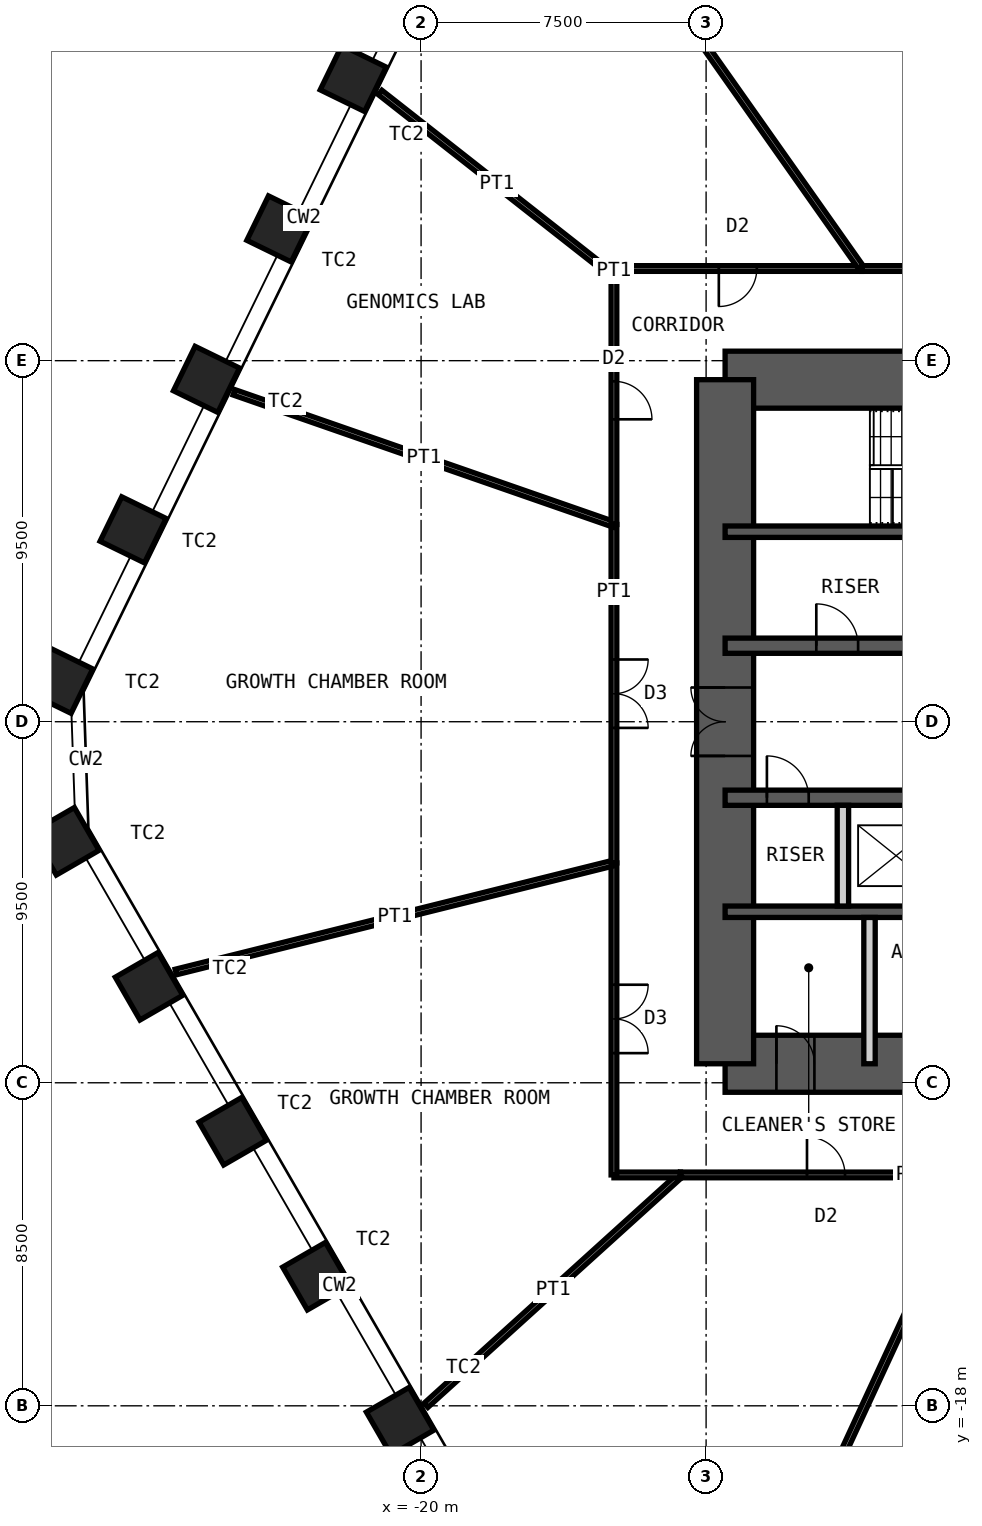
"""IFC4 building model, lengths in metres.
Left out: names, types, materials, properties, quantities, classifications, styles, units other than length and angle.
Written with IfcOpenShell. Run it as: python <this file> out.ifc"""

import sys

from ifc_helpers import new_model, si_unit, direction, frame, frame_2d, origin, origin_2d, place, context, subcontext, project, spatial, rectangle, hollow_rectangle, extrude, element, fill, save


model = new_model("IFC4")
c1 = context("Model", 3, precision=1e-05, world=origin(), true_north=direction((0.0, 1.0)))
c2 = subcontext(c1, "Body", "Model", "MODEL_VIEW")
j1 = project(units=[si_unit("LENGTHUNIT", "METRE"), si_unit("PLANEANGLEUNIT", "RADIAN")], contexts=[c1])
p1 = place(None, origin())
s1 = spatial("IfcSite", under=j1, at=p1, CompositionType="ELEMENT")
p2 = place(p1, origin())
s2 = spatial("IfcBuilding", under=s1, at=p2, CompositionType="ELEMENT")
p3 = place(p2, frame((0.0, 0.0, 82.0)))
s3 = spatial("IfcBuildingStorey", under=s2, at=p3, CompositionType="ELEMENT", Elevation=82.0)
for number, where, z_axis, x_axis in (
    (1, (-20.552, -18.404, 0.0), (0.0, 0.0, 1.0), (0.5, -0.866, 0.0)),
    (2, (-22.754, -14.589, 0.0), (0.0, 0.0, 1.0), (0.5, -0.866, 0.0)),
    (3, (-24.956, -10.775, 0.0), (0.0, 0.0, 1.0), (0.5, -0.866, 0.0)),
    (4, (-27.158, -6.96, 0.0), (0.0, 0.0, 1.0), (0.5, -0.866, 0.0)),
    (5, (-29.361, -3.146, 0.0), (0.0, 0.0, 1.0), (0.5, -0.866, 0.0)),
    (6, (-29.509, 1.09, 0.0), (0.0, 0.0, 1.0), (-0.438, -0.899, 0.0)),
    (7, (-27.578, 5.049, 0.0), (0.0, 0.0, 1.0), (-0.438, -0.899, 0.0)),
    (8, (-25.647, 9.008, 0.0), (0.0, 0.0, 1.0), (-0.438, -0.899, 0.0)),
    (9, (-23.716, 12.966, 0.0), (0.0, 0.0, 1.0), (-0.438, -0.899, 0.0)),
    (10, (-21.785, 16.925, 0.0), (0.0, 0.0, 1.0), (-0.438, -0.899, 0.0)),
):
    element("IfcColumn", number, at=place(p3, frame(where, z_axis=z_axis, x_axis=x_axis)), inside=s3, PredefinedType="COLUMN", context=c2, shape_type="SweptSolid", body=[
        extrude(hollow_rectangle(XDim=1.3, YDim=1.3, WallThickness=0.1, at=origin_2d()), origin(), (0.0, 0.0, 1.0), 5.0),
    ])
p4 = place(p3, frame((-12.0, 9.0, 0.0), z_axis=(0.0, 0.0, 1.0), x_axis=(1.0, 0.0, 0.0)))
e11 = element("IfcWall", 11, at=p4, inside=s3, PredefinedType="SHEAR", context=c2, shape_type="SweptSolid", body=[
    extrude(rectangle(XDim=24.0, YDim=1.5, at=frame_2d((12.0, 0.0))), origin(), (0.0, 0.0, 1.0), 5.0),
])
p5 = place(p4, frame((10.4, 0.0, 0.0)))
e12 = element("IfcOpeningElement", 12, at=p5, cuts=e11, PredefinedType="OPENING", context=c2, shape_type="SweptSolid", body=[
    extrude(rectangle(XDim=1.0, YDim=2.1, at=frame_2d((0.5, 1.05))), frame((0.0, 0.76, 0.0), z_axis=(0.0, -1.0, 0.0), x_axis=(1.0, 0.0, 0.0)), (0.0, 0.0, 1.0), 1.52),
])
p6 = place(p4, frame((17.6, 0.0, 0.0)))
e13 = element("IfcOpeningElement", 13, at=p6, cuts=e11, PredefinedType="OPENING", context=c2, shape_type="SweptSolid", body=[
    extrude(rectangle(XDim=0.9, YDim=2.1, at=frame_2d((0.45, 1.05))), frame((0.0, 0.76, 0.0), z_axis=(0.0, -1.0, 0.0), x_axis=(1.0, 0.0, 0.0)), (0.0, 0.0, 1.0), 1.52),
])
p7 = place(p4, frame((21.9, 0.0, 0.0)))
e14 = element("IfcOpeningElement", 14, at=p7, cuts=e11, PredefinedType="OPENING", context=c2, shape_type="SweptSolid", body=[
    extrude(rectangle(XDim=0.9, YDim=2.1, at=frame_2d((0.45, 1.05))), frame((0.0, 0.76, 0.0), z_axis=(0.0, -1.0, 0.0), x_axis=(1.0, 0.0, 0.0)), (0.0, 0.0, 1.0), 1.52),
])
p8 = place(p3, frame((-12.0, -9.0, 0.0), z_axis=(0.0, 0.0, 1.0), x_axis=(1.0, 0.0, 0.0)))
e15 = element("IfcWall", 15, at=p8, inside=s3, PredefinedType="SHEAR", context=c2, shape_type="SweptSolid", body=[
    extrude(rectangle(XDim=24.0, YDim=1.5, at=frame_2d((12.0, 0.0))), origin(), (0.0, 0.0, 1.0), 5.0),
])
p9 = place(p8, frame((1.35, 0.0, 0.0)))
e16 = element("IfcOpeningElement", 16, at=p9, cuts=e15, PredefinedType="OPENING", context=c2, shape_type="SweptSolid", body=[
    extrude(rectangle(XDim=1.0, YDim=2.1, at=frame_2d((0.5, 1.05))), frame((0.0, 0.76, 0.0), z_axis=(0.0, -1.0, 0.0), x_axis=(1.0, 0.0, 0.0)), (0.0, 0.0, 1.0), 1.52),
])
p10 = place(p8, frame((5.325, 0.0, 0.0)))
e17 = element("IfcOpeningElement", 17, at=p10, cuts=e15, PredefinedType="OPENING", context=c2, shape_type="SweptSolid", body=[
    extrude(rectangle(XDim=1.15, YDim=2.1, at=frame_2d((0.575, 1.05))), frame((0.0, 0.76, 0.0), z_axis=(0.0, -1.0, 0.0), x_axis=(1.0, 0.0, 0.0)), (0.0, 0.0, 1.0), 1.52),
])
p11 = place(p8, frame((12.6, 0.0, 0.0)))
e18 = element("IfcOpeningElement", 18, at=p11, cuts=e15, PredefinedType="OPENING", context=c2, shape_type="SweptSolid", body=[
    extrude(rectangle(XDim=1.0, YDim=2.1, at=frame_2d((0.5, 1.05))), frame((0.0, 0.76, 0.0), z_axis=(0.0, -1.0, 0.0), x_axis=(1.0, 0.0, 0.0)), (0.0, 0.0, 1.0), 1.52),
])
p12 = place(p3, frame((-12.0, -9.0, 0.0), z_axis=(0.0, 0.0, 1.0), x_axis=(0.0, 1.0, 0.0)))
e19 = element("IfcWall", 19, at=p12, inside=s3, PredefinedType="SHEAR", context=c2, shape_type="SweptSolid", body=[
    extrude(rectangle(XDim=18.0, YDim=1.5, at=frame_2d((9.0, 0.0))), origin(), (0.0, 0.0, 1.0), 5.0),
])
p13 = place(p12, frame((8.1, 0.0, 0.0)))
e20 = element("IfcOpeningElement", 20, at=p13, cuts=e19, PredefinedType="OPENING", context=c2, shape_type="SweptSolid", body=[
    extrude(rectangle(XDim=1.8, YDim=2.1, at=frame_2d((0.9, 1.05))), frame((0.0, 0.76, 0.0), z_axis=(0.0, -1.0, 0.0), x_axis=(1.0, 0.0, 0.0)), (0.0, 0.0, 1.0), 1.52),
])
p14 = place(p3, frame((-12.0, 5.0, 0.0), z_axis=(0.0, 0.0, 1.0), x_axis=(1.0, 0.0, 0.0)))
e21 = element("IfcWall", 21, at=p14, inside=s3, PredefinedType="SHEAR", context=c2, shape_type="SweptSolid", body=[
    extrude(rectangle(XDim=24.0, YDim=0.3, at=frame_2d((12.0, 0.0))), origin(), (0.0, 0.0, 1.0), 5.0),
])
p15 = place(p3, frame((-12.0, 2.0, 0.0), z_axis=(0.0, 0.0, 1.0), x_axis=(1.0, 0.0, 0.0)))
e22 = element("IfcWall", 22, at=p15, inside=s3, PredefinedType="SHEAR", context=c2, shape_type="SweptSolid", body=[
    extrude(rectangle(XDim=24.0, YDim=0.4, at=frame_2d((12.0, 0.0))), origin(), (0.0, 0.0, 1.0), 5.0),
])
p16 = place(p15, frame((2.4, 0.0, 0.0)))
e23 = element("IfcOpeningElement", 23, at=p16, cuts=e22, PredefinedType="OPENING", context=c2, shape_type="SweptSolid", body=[
    extrude(rectangle(XDim=1.1, YDim=2.1, at=frame_2d((0.55, 1.05))), frame((0.0, 0.21, 0.0), z_axis=(0.0, -1.0, 0.0), x_axis=(1.0, 0.0, 0.0)), (0.0, 0.0, 1.0), 0.42),
])
p17 = place(p15, frame((22.0, 0.0, 0.0)))
e24 = element("IfcOpeningElement", 24, at=p17, cuts=e22, PredefinedType="OPENING", context=c2, shape_type="SweptSolid", body=[
    extrude(rectangle(XDim=1.1, YDim=2.1, at=frame_2d((0.55, 1.05))), frame((0.0, 0.21, 0.0), z_axis=(0.0, -1.0, 0.0), x_axis=(1.0, 0.0, 0.0)), (0.0, 0.0, 1.0), 0.42),
])
p18 = place(p15, frame((10.15, 0.0, 0.0)))
e25 = element("IfcOpeningElement", 25, at=p18, cuts=e22, PredefinedType="OPENING", context=c2, shape_type="SweptSolid", body=[
    extrude(rectangle(XDim=1.0, YDim=2.1, at=frame_2d((0.5, 1.05))), frame((0.0, 0.21, 0.0), z_axis=(0.0, -1.0, 0.0), x_axis=(1.0, 0.0, 0.0)), (0.0, 0.0, 1.0), 0.42),
])
p19 = place(p15, frame((6.7, 0.0, 0.0)))
e26 = element("IfcOpeningElement", 26, at=p19, cuts=e22, PredefinedType="OPENING", context=c2, shape_type="SweptSolid", body=[
    extrude(rectangle(XDim=1.4, YDim=2.4, at=frame_2d((0.7, 1.2))), frame((0.0, 0.21, 0.0), z_axis=(0.0, -1.0, 0.0), x_axis=(1.0, 0.0, 0.0)), (0.0, 0.0, 1.0), 0.42),
])
p20 = place(p15, frame((13.35, 0.0, 0.0)))
e27 = element("IfcOpeningElement", 27, at=p20, cuts=e22, PredefinedType="OPENING", context=c2, shape_type="SweptSolid", body=[
    extrude(rectangle(XDim=1.1, YDim=2.4, at=frame_2d((0.55, 1.2))), frame((0.0, 0.21, 0.0), z_axis=(0.0, -1.0, 0.0), x_axis=(1.0, 0.0, 0.0)), (0.0, 0.0, 1.0), 0.42),
])
p21 = place(p15, frame((16.15, 0.0, 0.0)))
e28 = element("IfcOpeningElement", 28, at=p21, cuts=e22, PredefinedType="OPENING", context=c2, shape_type="SweptSolid", body=[
    extrude(rectangle(XDim=1.1, YDim=2.4, at=frame_2d((0.55, 1.2))), frame((0.0, 0.21, 0.0), z_axis=(0.0, -1.0, 0.0), x_axis=(1.0, 0.0, 0.0)), (0.0, 0.0, 1.0), 0.42),
])
p22 = place(p15, frame((18.95, 0.0, 0.0)))
e29 = element("IfcOpeningElement", 29, at=p22, cuts=e22, PredefinedType="OPENING", context=c2, shape_type="SweptSolid", body=[
    extrude(rectangle(XDim=1.1, YDim=2.4, at=frame_2d((0.55, 1.2))), frame((0.0, 0.21, 0.0), z_axis=(0.0, -1.0, 0.0), x_axis=(1.0, 0.0, 0.0)), (0.0, 0.0, 1.0), 0.42),
])
p23 = place(p3, frame((-12.0, -2.0, 0.0), z_axis=(0.0, 0.0, 1.0), x_axis=(1.0, 0.0, 0.0)))
e30 = element("IfcWall", 30, at=p23, inside=s3, PredefinedType="SHEAR", context=c2, shape_type="SweptSolid", body=[
    extrude(rectangle(XDim=24.0, YDim=0.4, at=frame_2d((12.0, 0.0))), origin(), (0.0, 0.0, 1.0), 5.0),
])
p24 = place(p23, frame((1.1, 0.0, 0.0)))
e31 = element("IfcOpeningElement", 31, at=p24, cuts=e30, PredefinedType="OPENING", context=c2, shape_type="SweptSolid", body=[
    extrude(rectangle(XDim=1.1, YDim=2.1, at=frame_2d((0.55, 1.05))), frame((0.0, 0.21, 0.0), z_axis=(0.0, -1.0, 0.0), x_axis=(1.0, 0.0, 0.0)), (0.0, 0.0, 1.0), 0.42),
])
p25 = place(p23, frame((13.55, 0.0, 0.0)))
e32 = element("IfcOpeningElement", 32, at=p25, cuts=e30, PredefinedType="OPENING", context=c2, shape_type="SweptSolid", body=[
    extrude(rectangle(XDim=1.1, YDim=2.1, at=frame_2d((0.55, 1.05))), frame((0.0, 0.21, 0.0), z_axis=(0.0, -1.0, 0.0), x_axis=(1.0, 0.0, 0.0)), (0.0, 0.0, 1.0), 0.42),
])
p26 = place(p23, frame((20.7, 0.0, 0.0)))
e33 = element("IfcOpeningElement", 33, at=p26, cuts=e30, PredefinedType="OPENING", context=c2, shape_type="SweptSolid", body=[
    extrude(rectangle(XDim=1.1, YDim=2.1, at=frame_2d((0.55, 1.05))), frame((0.0, 0.21, 0.0), z_axis=(0.0, -1.0, 0.0), x_axis=(1.0, 0.0, 0.0)), (0.0, 0.0, 1.0), 0.42),
])
p27 = place(p3, frame((-12.0, -5.0, 0.0), z_axis=(0.0, 0.0, 1.0), x_axis=(1.0, 0.0, 0.0)))
e34 = element("IfcWall", 34, at=p27, inside=s3, PredefinedType="SHEAR", context=c2, shape_type="SweptSolid", body=[
    extrude(rectangle(XDim=24.0, YDim=0.3, at=frame_2d((12.0, 0.0))), origin(), (0.0, 0.0, 1.0), 5.0),
])
p28 = place(p3, frame((-8.9, -4.85, 0.0), z_axis=(0.0, 0.0, 1.0), x_axis=(0.0, 1.0, 0.0)))
e35 = element("IfcWall", 35, at=p28, inside=s3, PredefinedType="PARTITIONING", context=c2, shape_type="SweptSolid", body=[
    extrude(rectangle(XDim=2.65, YDim=0.3, at=frame_2d((1.325, 0.0))), origin(), (0.0, 0.0, 1.0), 4.78),
])
p29 = place(p3, frame((-8.2, -9.0, 0.0), z_axis=(0.0, 0.0, 1.0), x_axis=(0.0, 1.0, 0.0)))
e36 = element("IfcWall", 36, at=p29, inside=s3, PredefinedType="PARTITIONING", context=c2, shape_type="SweptSolid", body=[
    extrude(rectangle(XDim=3.85, YDim=0.3, at=frame_2d((1.925, 0.0))), origin(), (0.0, 0.0, 1.0), 4.78),
])
p30 = place(p3, frame((-12.56, -27.155, 0.0), z_axis=(0.0, 0.0, 1.0), x_axis=(0.41979248878, 0.90762011126, 0.0)))
e37 = element("IfcWall", 37, at=p30, inside=s3, PredefinedType="PARTITIONING", context=c2, shape_type="SweptSolid", body=[
    extrude(rectangle(XDim=16.78, YDim=0.15, at=frame_2d((8.39, 0.0))), origin(), (0.0, 0.0, 1.0), 3.7),
])
p31 = place(p3, frame((-5.516, -11.925, 0.0), z_axis=(0.0, 0.0, 1.0), x_axis=(-1.0, 0.0, 0.0)))
e38 = element("IfcWall", 38, at=p31, inside=s3, PredefinedType="PARTITIONING", context=c2, shape_type="SweptSolid", body=[
    extrude(rectangle(XDim=7.659, YDim=0.15, at=frame_2d((3.83, 0.0))), origin(), (0.0, 0.0, 1.0), 4.8),
])
p32 = place(p31, frame((3.329, 0.0, 0.0)))
e39 = element("IfcOpeningElement", 39, at=p32, cuts=e38, PredefinedType="OPENING", context=c2, shape_type="SweptSolid", body=[
    extrude(rectangle(XDim=1.0, YDim=2.4, at=frame_2d((0.5, 1.2))), frame((0.0, 0.085, 0.0), z_axis=(0.0, -1.0, 0.0), x_axis=(1.0, 0.0, 0.0)), (0.0, 0.0, 1.0), 0.17),
])
p33 = place(p3, frame((-19.871, -17.987, 0.0), z_axis=(0.0, 0.0, 1.0), x_axis=(0.741383998931, 0.671081042892, 0.0)))
e40 = element("IfcWall", 40, at=p33, inside=s3, PredefinedType="PARTITIONING", context=c2, shape_type="SweptSolid", body=[
    extrude(rectangle(XDim=9.032, YDim=0.15, at=frame_2d((4.516, 0.0))), origin(), (0.0, 0.0, 1.0), 3.7),
])
p34 = place(p3, frame((-13.175, -11.925, 0.0), z_axis=(0.0, 0.0, 1.0), x_axis=(-1.0, 0.0, 0.0)))
e41 = element("IfcWall", 41, at=p34, inside=s3, PredefinedType="PARTITIONING", context=c2, shape_type="SweptSolid", body=[
    extrude(rectangle(XDim=1.75, YDim=0.15, at=frame_2d((0.875, 0.0))), origin(), (0.0, 0.0, 1.0), 4.8),
])
p35 = place(p3, frame((-14.925, -11.925, 0.0), z_axis=(0.0, 0.0, 1.0), x_axis=(0.0, 1.0, 0.0)))
e42 = element("IfcWall", 42, at=p35, inside=s3, PredefinedType="PARTITIONING", context=c2, shape_type="SweptSolid", body=[
    extrude(rectangle(XDim=8.209, YDim=0.15, at=frame_2d((4.105, 0.0))), origin(), (0.0, 0.0, 1.0), 4.8),
])
p36 = place(p35, frame((3.205, 0.0, 0.0)))
e43 = element("IfcOpeningElement", 43, at=p36, cuts=e42, PredefinedType="OPENING", context=c2, shape_type="SweptSolid", body=[
    extrude(rectangle(XDim=1.8, YDim=2.4, at=frame_2d((0.9, 1.2))), frame((0.0, 0.085, 0.0), z_axis=(0.0, -1.0, 0.0), x_axis=(1.0, 0.0, 0.0)), (0.0, 0.0, 1.0), 0.17),
])
p37 = place(p3, frame((-26.455, -6.586, 0.0), z_axis=(0.0, 0.0, 1.0), x_axis=(0.970383745231, 0.241568596864, 0.0)))
e44 = element("IfcWall", 44, at=p37, inside=s3, PredefinedType="PARTITIONING", context=c2, shape_type="SweptSolid", body=[
    extrude(rectangle(XDim=11.882, YDim=0.15, at=frame_2d((5.941, 0.0))), origin(), (0.0, 0.0, 1.0), 3.7),
])
p38 = place(p3, frame((-14.925, -3.716, 0.0), z_axis=(0.0, 0.0, 1.0), x_axis=(0.0, 1.0, 0.0)))
e45 = element("IfcWall", 45, at=p38, inside=s3, PredefinedType="PARTITIONING", context=c2, shape_type="SweptSolid", body=[
    extrude(rectangle(XDim=8.906, YDim=0.15, at=frame_2d((4.453, 0.0))), origin(), (0.0, 0.0, 1.0), 4.8),
])
p39 = place(p38, frame((3.553, 0.0, 0.0)))
e46 = element("IfcOpeningElement", 46, at=p39, cuts=e45, PredefinedType="OPENING", context=c2, shape_type="SweptSolid", body=[
    extrude(rectangle(XDim=1.8, YDim=2.4, at=frame_2d((0.9, 1.2))), frame((0.0, 0.085, 0.0), z_axis=(0.0, -1.0, 0.0), x_axis=(1.0, 0.0, 0.0)), (0.0, 0.0, 1.0), 0.17),
])
p40 = place(p3, frame((-24.923, 8.668, 0.0), z_axis=(0.0, 0.0, 1.0), x_axis=(0.944507686068, -0.328489316354, 0.0)))
e47 = element("IfcWall", 47, at=p40, inside=s3, PredefinedType="PARTITIONING", context=c2, shape_type="SweptSolid", body=[
    extrude(rectangle(XDim=10.586, YDim=0.15, at=frame_2d((5.293, 0.0))), origin(), (0.0, 0.0, 1.0), 3.7),
])
p41 = place(p3, frame((-14.925, 5.191, 0.0), z_axis=(0.0, 0.0, 1.0), x_axis=(0.0, 1.0, 0.0)))
e48 = element("IfcWall", 48, at=p41, inside=s3, PredefinedType="PARTITIONING", context=c2, shape_type="SweptSolid", body=[
    extrude(rectangle(XDim=6.533, YDim=0.15, at=frame_2d((3.267, 0.0))), origin(), (0.0, 0.0, 1.0), 4.8),
])
p42 = place(p41, frame((2.767, 0.0, 0.0)))
e49 = element("IfcOpeningElement", 49, at=p42, cuts=e48, PredefinedType="OPENING", context=c2, shape_type="SweptSolid", body=[
    extrude(rectangle(XDim=1.0, YDim=2.4, at=frame_2d((0.5, 1.2))), frame((0.0, 0.085, 0.0), z_axis=(0.0, -1.0, 0.0), x_axis=(1.0, 0.0, 0.0)), (0.0, 0.0, 1.0), 0.17),
])
p43 = place(p3, frame((-21.077, 16.557, 0.0), z_axis=(0.0, 0.0, 1.0), x_axis=(0.78639413325, -0.617725074115, 0.0)))
e50 = element("IfcWall", 50, at=p43, inside=s3, PredefinedType="PARTITIONING", context=c2, shape_type="SweptSolid", body=[
    extrude(rectangle(XDim=7.823, YDim=0.15, at=frame_2d((3.912, 0.0))), origin(), (0.0, 0.0, 1.0), 3.7),
])
p44 = place(p3, frame((-14.925, 11.819, 0.0), z_axis=(0.0, 0.0, 1.0), x_axis=(0.0, 1.0, 0.0)))
e51 = element("IfcWall", 51, at=p44, inside=s3, PredefinedType="PARTITIONING", context=c2, shape_type="SweptSolid", body=[
    extrude(rectangle(XDim=0.106, YDim=0.15, at=frame_2d((0.053, 0.0))), origin(), (0.0, 0.0, 1.0), 4.8),
])
p45 = place(p3, frame((-14.925, 11.925, 0.0), z_axis=(0.0, 0.0, 1.0), x_axis=(1.0, 0.0, 0.0)))
e52 = element("IfcWall", 52, at=p45, inside=s3, PredefinedType="PARTITIONING", context=c2, shape_type="SweptSolid", body=[
    extrude(rectangle(XDim=6.52, YDim=0.15, at=frame_2d((3.26, 0.0))), origin(), (0.0, 0.0, 1.0), 4.8),
])
p46 = place(p45, frame((2.76, 0.0, 0.0)))
e53 = element("IfcOpeningElement", 53, at=p46, cuts=e52, PredefinedType="OPENING", context=c2, shape_type="SweptSolid", body=[
    extrude(rectangle(XDim=1.0, YDim=2.4, at=frame_2d((0.5, 1.2))), frame((0.0, 0.085, 0.0), z_axis=(0.0, -1.0, 0.0), x_axis=(1.0, 0.0, 0.0)), (0.0, 0.0, 1.0), 0.17),
])
p47 = place(p3, frame((-17.237, 24.454, 0.0), z_axis=(0.0, 0.0, 1.0), x_axis=(0.576120914166, -0.817364479446, 0.0)))
e54 = element("IfcWall", 54, at=p47, inside=s3, PredefinedType="PARTITIONING", context=c2, shape_type="SweptSolid", body=[
    extrude(rectangle(XDim=15.329, YDim=0.15, at=frame_2d((7.665, 0.0))), origin(), (0.0, 0.0, 1.0), 3.7),
])
p48 = place(p3, frame((-8.406, 11.925, 0.0), z_axis=(0.0, 0.0, 1.0), x_axis=(1.0, 0.0, 0.0)))
e55 = element("IfcWall", 55, at=p48, inside=s3, PredefinedType="PARTITIONING", context=c2, shape_type="SweptSolid", body=[
    extrude(rectangle(XDim=5.838, YDim=0.15, at=frame_2d((2.919, 0.0))), origin(), (0.0, 0.0, 1.0), 4.8),
])
p49 = place(p48, frame((2.419, 0.0, 0.0)))
e56 = element("IfcOpeningElement", 56, at=p49, cuts=e55, PredefinedType="OPENING", context=c2, shape_type="SweptSolid", body=[
    extrude(rectangle(XDim=1.0, YDim=2.4, at=frame_2d((0.5, 1.2))), frame((0.0, 0.085, 0.0), z_axis=(0.0, -1.0, 0.0), x_axis=(1.0, 0.0, 0.0)), (0.0, 0.0, 1.0), 0.17),
])
p50 = place(p9, origin())
e57 = element("IfcDoor", 57, at=p50, inside=s3, OperationType="SINGLE_SWING_RIGHT", PredefinedType="DOOR", context=c2, shape_type="SweptSolid", body=[
    extrude(rectangle(XDim=1.0, YDim=2.1, at=frame_2d((0.5, 1.05))), frame((0.0, 0.025, 0.0), z_axis=(0.0, -1.0, 0.0), x_axis=(1.0, 0.0, 0.0)), (0.0, 0.0, 1.0), 0.05),
])
fill(e16, e57)
p51 = place(p16, origin())
e58 = element("IfcDoor", 58, at=p51, inside=s3, OperationType="SINGLE_SWING_RIGHT", PredefinedType="DOOR", context=c2, shape_type="SweptSolid", body=[
    extrude(rectangle(XDim=1.1, YDim=2.1, at=frame_2d((0.55, 1.05))), frame((0.0, 0.025, 0.0), z_axis=(0.0, -1.0, 0.0), x_axis=(1.0, 0.0, 0.0)), (0.0, 0.0, 1.0), 0.05),
])
fill(e23, e58)
p52 = place(p24, origin())
e59 = element("IfcDoor", 59, at=p52, inside=s3, OperationType="SINGLE_SWING_RIGHT", PredefinedType="DOOR", context=c2, shape_type="SweptSolid", body=[
    extrude(rectangle(XDim=1.1, YDim=2.1, at=frame_2d((0.55, 1.05))), frame((0.0, 0.025, 0.0), z_axis=(0.0, -1.0, 0.0), x_axis=(1.0, 0.0, 0.0)), (0.0, 0.0, 1.0), 0.05),
])
fill(e31, e59)
p53 = place(p13, origin())
e60 = element("IfcDoor", 60, at=p53, inside=s3, OperationType="DOUBLE_DOOR_DOUBLE_SWING", PredefinedType="DOOR", context=c2, shape_type="SweptSolid", body=[
    extrude(rectangle(XDim=1.8, YDim=2.1, at=frame_2d((0.9, 1.05))), frame((0.0, 0.025, 0.0), z_axis=(0.0, -1.0, 0.0), x_axis=(1.0, 0.0, 0.0)), (0.0, 0.0, 1.0), 0.05),
])
fill(e20, e60)
p54 = place(p32, origin())
e61 = element("IfcDoor", 61, at=p54, inside=s3, OperationType="SINGLE_SWING_RIGHT", PredefinedType="DOOR", context=c2, shape_type="SweptSolid", body=[
    extrude(rectangle(XDim=1.0, YDim=2.4, at=frame_2d((0.5, 1.2))), frame((0.0, 0.025, 0.0), z_axis=(0.0, -1.0, 0.0), x_axis=(1.0, 0.0, 0.0)), (0.0, 0.0, 1.0), 0.05),
])
fill(e39, e61)
p55 = place(p36, origin())
e62 = element("IfcDoor", 62, at=p55, inside=s3, OperationType="DOUBLE_DOOR_DOUBLE_SWING", PredefinedType="DOOR", context=c2, shape_type="SweptSolid", body=[
    extrude(rectangle(XDim=1.8, YDim=2.4, at=frame_2d((0.9, 1.2))), frame((0.0, 0.025, 0.0), z_axis=(0.0, -1.0, 0.0), x_axis=(1.0, 0.0, 0.0)), (0.0, 0.0, 1.0), 0.05),
])
fill(e43, e62)
p56 = place(p39, origin())
e63 = element("IfcDoor", 63, at=p56, inside=s3, OperationType="DOUBLE_DOOR_DOUBLE_SWING", PredefinedType="DOOR", context=c2, shape_type="SweptSolid", body=[
    extrude(rectangle(XDim=1.8, YDim=2.4, at=frame_2d((0.9, 1.2))), frame((0.0, 0.025, 0.0), z_axis=(0.0, -1.0, 0.0), x_axis=(1.0, 0.0, 0.0)), (0.0, 0.0, 1.0), 0.05),
])
fill(e46, e63)
p57 = place(p42, origin())
e64 = element("IfcDoor", 64, at=p57, inside=s3, OperationType="SINGLE_SWING_LEFT", PredefinedType="DOOR", context=c2, shape_type="SweptSolid", body=[
    extrude(rectangle(XDim=1.0, YDim=2.4, at=frame_2d((0.5, 1.2))), frame((0.0, 0.025, 0.0), z_axis=(0.0, -1.0, 0.0), x_axis=(1.0, 0.0, 0.0)), (0.0, 0.0, 1.0), 0.05),
])
fill(e49, e64)
p58 = place(p46, origin())
e65 = element("IfcDoor", 65, at=p58, inside=s3, OperationType="SINGLE_SWING_LEFT", PredefinedType="DOOR", context=c2, shape_type="SweptSolid", body=[
    extrude(rectangle(XDim=1.0, YDim=2.4, at=frame_2d((0.5, 1.2))), frame((0.0, 0.025, 0.0), z_axis=(0.0, -1.0, 0.0), x_axis=(1.0, 0.0, 0.0)), (0.0, 0.0, 1.0), 0.05),
])
fill(e53, e65)
save(model, sys.argv[1])
